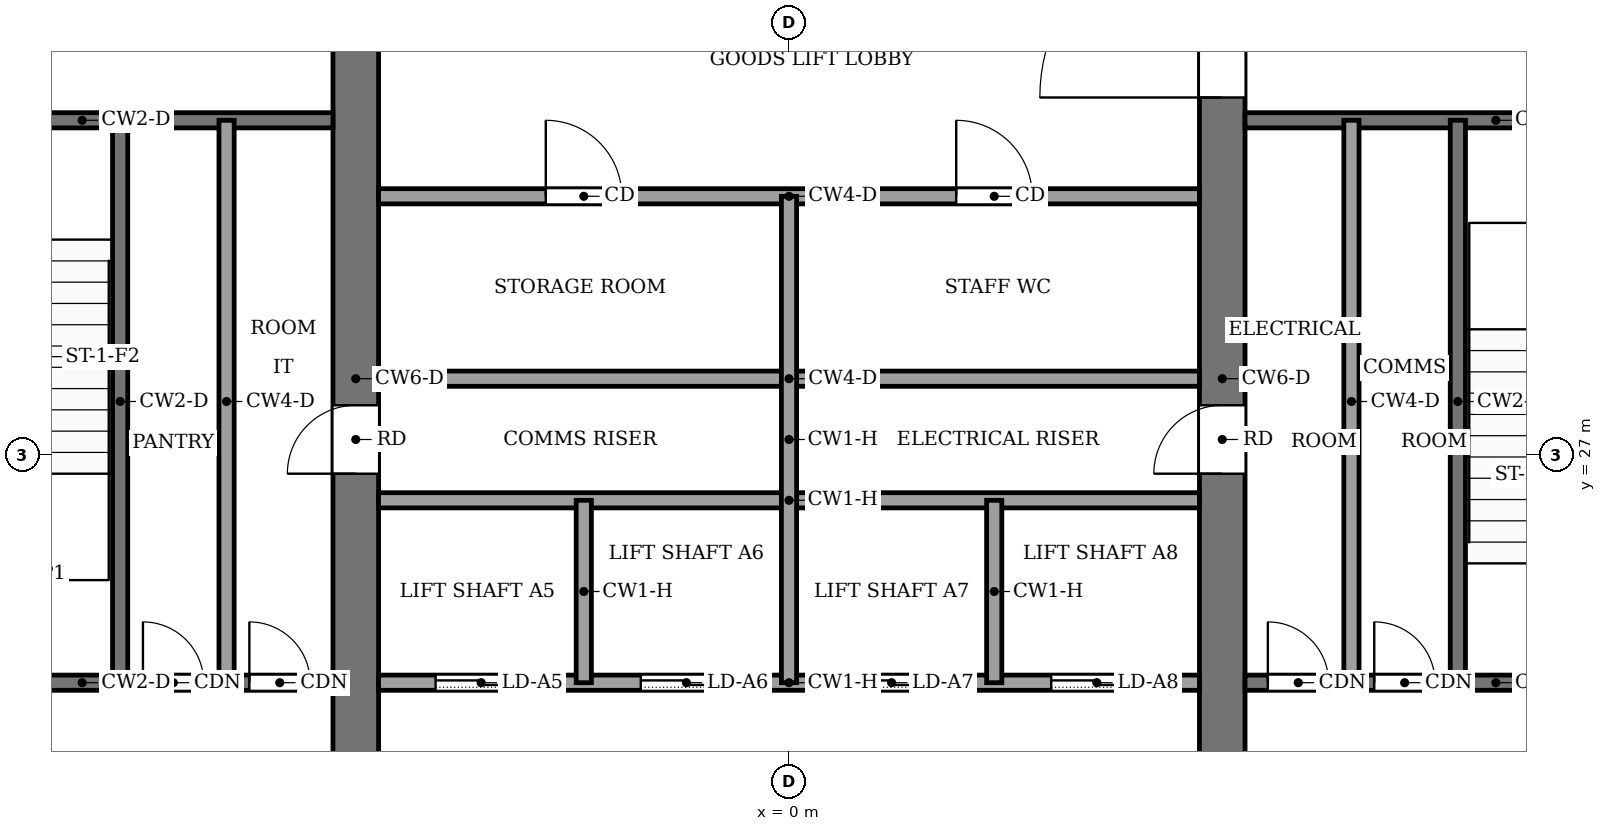
"""IFC4 building model, lengths in metres.
Left out: names, types, materials, properties, quantities, classifications, styles, units other than length and angle.
Written with IfcOpenShell. Run it as: python <this file> out.ifc"""

import sys

from ifc_helpers import new_model, si_unit, direction, frame, frame_2d, origin, place, context, subcontext, project, spatial, rectangle, extrude, element, fill, save


model = new_model("IFC4")
c1 = context("Model", 3, precision=1e-05, world=origin(), true_north=direction((0.0, 1.0)))
c2 = subcontext(c1, "Body", "Model", "MODEL_VIEW")
j1 = project(units=[si_unit("LENGTHUNIT", "METRE"), si_unit("PLANEANGLEUNIT", "RADIAN")], contexts=[c1])
p1 = place(None, origin())
s1 = spatial("IfcSite", under=j1, at=p1, CompositionType="ELEMENT")
p2 = place(p1, origin())
s2 = spatial("IfcBuilding", under=s1, at=p2, CompositionType="ELEMENT")
p3 = place(p2, frame((0.0, 0.0, 222.0)))
s3 = spatial("IfcBuildingStorey", under=s2, at=p3, CompositionType="ELEMENT", Elevation=222.0)
p4 = place(p3, frame((-5.7, 18.4, -0.13), z_axis=(0.0, 0.0, 1.0), x_axis=(0.0, 1.0, 0.0)))
e1 = element("IfcWall", 1, at=p4, inside=s3, PredefinedType="SHEAR", context=c2, shape_type="SweptSolid", body=[
    extrude(rectangle(XDim=19.2, YDim=0.6, at=frame_2d((9.6, 0.0))), origin(), (0.0, 0.0, 1.0), 3.88),
])
p5 = place(p4, frame((8.35, 0.0, 0.13)))
e2 = element("IfcOpeningElement", 2, at=p5, cuts=e1, PredefinedType="OPENING", context=c2, shape_type="SweptSolid", body=[
    extrude(rectangle(XDim=0.9, YDim=2.1, at=frame_2d((0.45, 1.05))), frame((0.0, 0.31, 0.0), z_axis=(0.0, -1.0, 0.0), x_axis=(1.0, 0.0, 0.0)), (0.0, 0.0, 1.0), 0.62),
])
p6 = place(p3, frame((5.7, 18.4, -0.13), z_axis=(0.0, 0.0, 1.0), x_axis=(0.0, 1.0, 0.0)))
e3 = element("IfcWall", 3, at=p6, inside=s3, PredefinedType="SHEAR", context=c2, shape_type="SweptSolid", body=[
    extrude(rectangle(XDim=19.2, YDim=0.6, at=frame_2d((9.6, 0.0))), origin(), (0.0, 0.0, 1.0), 3.88),
])
p7 = place(p6, frame((8.35, 0.0, 0.13)))
e4 = element("IfcOpeningElement", 4, at=p7, cuts=e3, PredefinedType="OPENING", context=c2, shape_type="SweptSolid", body=[
    extrude(rectangle(XDim=0.9, YDim=2.1, at=frame_2d((0.45, 1.05))), frame((0.0, 0.31, 0.0), z_axis=(0.0, -1.0, 0.0), x_axis=(1.0, 0.0, 0.0)), (0.0, 0.0, 1.0), 0.62),
])
p8 = place(p6, frame((13.3, 0.0, 0.13)))
e5 = element("IfcOpeningElement", 5, at=p8, cuts=e3, PredefinedType="OPENING", context=c2, shape_type="SweptSolid", body=[
    extrude(rectangle(XDim=2.4, YDim=2.4, at=frame_2d((1.2, 1.2))), frame((0.0, 0.31, 0.0), z_axis=(0.0, -1.0, 0.0), x_axis=(1.0, 0.0, 0.0)), (0.0, 0.0, 1.0), 0.62),
])
p9 = place(p3, frame((-12.6, 24.0, 0.0), z_axis=(0.0, 0.0, 1.0), x_axis=(1.0, 0.0, 0.0)))
e6 = element("IfcWall", 6, at=p9, inside=s3, PredefinedType="PARTITIONING", context=c2, shape_type="SweptSolid", body=[
    extrude(rectangle(XDim=6.6, YDim=0.2, at=frame_2d((3.3, 0.0))), origin(), (0.0, 0.0, 1.0), 3.75),
])
p10 = place(p9, frame((4.1, 0.0, 0.0)))
e7 = element("IfcOpeningElement", 7, at=p10, cuts=e6, PredefinedType="OPENING", context=c2, shape_type="SweptSolid", body=[
    extrude(rectangle(XDim=0.8, YDim=2.1, at=frame_2d((0.4, 1.05))), frame((0.0, 0.11, 0.0), z_axis=(0.0, -1.0, 0.0), x_axis=(1.0, 0.0, 0.0)), (0.0, 0.0, 1.0), 0.22),
])
p11 = place(p9, frame((5.5, 0.0, 0.0)))
e8 = element("IfcOpeningElement", 8, at=p11, cuts=e6, PredefinedType="OPENING", context=c2, shape_type="SweptSolid", body=[
    extrude(rectangle(XDim=0.8, YDim=2.1, at=frame_2d((0.4, 1.05))), frame((0.0, 0.11, 0.0), z_axis=(0.0, -1.0, 0.0), x_axis=(1.0, 0.0, 0.0)), (0.0, 0.0, 1.0), 0.22),
])
p12 = place(p3, frame((-5.4, 24.0, 0.0), z_axis=(0.0, 0.0, 1.0), x_axis=(1.0, 0.0, 0.0)))
e9 = element("IfcWall", 9, at=p12, inside=s3, PredefinedType="PARTITIONING", context=c2, shape_type="SweptSolid", body=[
    extrude(rectangle(XDim=10.8, YDim=0.2, at=frame_2d((5.4, 0.0))), origin(), (0.0, 0.0, 1.0), 3.75),
])
p13 = place(p12, frame((0.75, 0.0, 0.0)))
e10 = element("IfcOpeningElement", 10, at=p13, cuts=e9, PredefinedType="OPENING", context=c2, shape_type="SweptSolid", body=[
    extrude(rectangle(XDim=1.2, YDim=2.2, at=frame_2d((0.6, 1.1))), frame((0.0, 0.11, 0.0), z_axis=(0.0, -1.0, 0.0), x_axis=(1.0, 0.0, 0.0)), (0.0, 0.0, 1.0), 0.22),
])
p14 = place(p12, frame((3.45, 0.0, 0.0)))
e11 = element("IfcOpeningElement", 11, at=p14, cuts=e9, PredefinedType="OPENING", context=c2, shape_type="SweptSolid", body=[
    extrude(rectangle(XDim=1.2, YDim=2.2, at=frame_2d((0.6, 1.1))), frame((0.0, 0.11, 0.0), z_axis=(0.0, -1.0, 0.0), x_axis=(1.0, 0.0, 0.0)), (0.0, 0.0, 1.0), 0.22),
])
p15 = place(p12, frame((6.15, 0.0, 0.0)))
e12 = element("IfcOpeningElement", 12, at=p15, cuts=e9, PredefinedType="OPENING", context=c2, shape_type="SweptSolid", body=[
    extrude(rectangle(XDim=1.2, YDim=2.2, at=frame_2d((0.6, 1.1))), frame((0.0, 0.11, 0.0), z_axis=(0.0, -1.0, 0.0), x_axis=(1.0, 0.0, 0.0)), (0.0, 0.0, 1.0), 0.22),
])
p16 = place(p12, frame((8.85, 0.0, 0.0)))
e13 = element("IfcOpeningElement", 13, at=p16, cuts=e9, PredefinedType="OPENING", context=c2, shape_type="SweptSolid", body=[
    extrude(rectangle(XDim=1.2, YDim=2.2, at=frame_2d((0.6, 1.1))), frame((0.0, 0.11, 0.0), z_axis=(0.0, -1.0, 0.0), x_axis=(1.0, 0.0, 0.0)), (0.0, 0.0, 1.0), 0.22),
])
p17 = place(p3, frame((6.0, 24.0, 0.0), z_axis=(0.0, 0.0, 1.0), x_axis=(1.0, 0.0, 0.0)))
e14 = element("IfcWall", 14, at=p17, inside=s3, PredefinedType="PARTITIONING", context=c2, shape_type="SweptSolid", body=[
    extrude(rectangle(XDim=6.6, YDim=0.2, at=frame_2d((3.3, 0.0))), origin(), (0.0, 0.0, 1.0), 3.75),
])
p18 = place(p17, frame((0.3, 0.0, 0.0)))
e15 = element("IfcOpeningElement", 15, at=p18, cuts=e14, PredefinedType="OPENING", context=c2, shape_type="SweptSolid", body=[
    extrude(rectangle(XDim=0.8, YDim=2.1, at=frame_2d((0.4, 1.05))), frame((0.0, 0.11, 0.0), z_axis=(0.0, -1.0, 0.0), x_axis=(1.0, 0.0, 0.0)), (0.0, 0.0, 1.0), 0.22),
])
p19 = place(p17, frame((1.7, 0.0, 0.0)))
e16 = element("IfcOpeningElement", 16, at=p19, cuts=e14, PredefinedType="OPENING", context=c2, shape_type="SweptSolid", body=[
    extrude(rectangle(XDim=0.8, YDim=2.1, at=frame_2d((0.4, 1.05))), frame((0.0, 0.11, 0.0), z_axis=(0.0, -1.0, 0.0), x_axis=(1.0, 0.0, 0.0)), (0.0, 0.0, 1.0), 0.22),
])
p20 = place(p17, frame((4.4, 0.0, 0.0)))
e17 = element("IfcOpeningElement", 17, at=p20, cuts=e14, PredefinedType="OPENING", context=c2, shape_type="SweptSolid", body=[
    extrude(rectangle(XDim=1.2, YDim=2.2, at=frame_2d((0.6, 1.1))), frame((0.0, 0.11, 0.0), z_axis=(0.0, -1.0, 0.0), x_axis=(1.0, 0.0, 0.0)), (0.0, 0.0, 1.0), 0.22),
])
for number, where, z_axis, x_axis in (
    (18, (-5.4, 26.4, 0.0), (0.0, 0.0, 1.0), (1.0, 0.0, 0.0)),
    (19, (-5.4, 28.0, 0.0), (0.0, 0.0, 1.0), (1.0, 0.0, 0.0)),
):
    element("IfcWall", number, at=place(p3, frame(where, z_axis=z_axis, x_axis=x_axis)), inside=s3, PredefinedType="PARTITIONING", context=c2, shape_type="SweptSolid", body=[
        extrude(rectangle(XDim=10.8, YDim=0.2, at=frame_2d((5.4, 0.0))), origin(), (0.0, 0.0, 1.0), 3.75),
    ])
p21 = place(p3, frame((-5.4, 30.4, 0.0), z_axis=(0.0, 0.0, 1.0), x_axis=(1.0, 0.0, 0.0)))
e20 = element("IfcWall", 20, at=p21, inside=s3, PredefinedType="PARTITIONING", context=c2, shape_type="SweptSolid", body=[
    extrude(rectangle(XDim=10.8, YDim=0.2, at=frame_2d((5.4, 0.0))), origin(), (0.0, 0.0, 1.0), 3.75),
])
p22 = place(p21, frame((2.2, 0.0, 0.0)))
e21 = element("IfcOpeningElement", 21, at=p22, cuts=e20, PredefinedType="OPENING", context=c2, shape_type="SweptSolid", body=[
    extrude(rectangle(XDim=1.0, YDim=2.1, at=frame_2d((0.5, 1.05))), frame((0.0, 0.11, 0.0), z_axis=(0.0, -1.0, 0.0), x_axis=(1.0, 0.0, 0.0)), (0.0, 0.0, 1.0), 0.22),
])
p23 = place(p21, frame((7.6, 0.0, 0.0)))
e22 = element("IfcOpeningElement", 22, at=p23, cuts=e20, PredefinedType="OPENING", context=c2, shape_type="SweptSolid", body=[
    extrude(rectangle(XDim=1.0, YDim=2.1, at=frame_2d((0.5, 1.05))), frame((0.0, 0.11, 0.0), z_axis=(0.0, -1.0, 0.0), x_axis=(1.0, 0.0, 0.0)), (0.0, 0.0, 1.0), 0.22),
])
p24 = place(p3, frame((-12.6, 31.4, 0.0), z_axis=(0.0, 0.0, 1.0), x_axis=(1.0, 0.0, 0.0)))
e23 = element("IfcWall", 23, at=p24, inside=s3, PredefinedType="PARTITIONING", context=c2, shape_type="SweptSolid", body=[
    extrude(rectangle(XDim=6.6, YDim=0.2, at=frame_2d((3.3, 0.0))), origin(), (0.0, 0.0, 1.0), 3.75),
])
p25 = place(p24, frame((1.0, 0.0, 0.0)))
e24 = element("IfcOpeningElement", 24, at=p25, cuts=e23, PredefinedType="OPENING", context=c2, shape_type="SweptSolid", body=[
    extrude(rectangle(XDim=1.2, YDim=2.2, at=frame_2d((0.6, 1.1))), frame((0.0, 0.11, 0.0), z_axis=(0.0, -1.0, 0.0), x_axis=(1.0, 0.0, 0.0)), (0.0, 0.0, 1.0), 0.22),
])
p26 = place(p3, frame((6.0, 31.4, 0.0), z_axis=(0.0, 0.0, 1.0), x_axis=(1.0, 0.0, 0.0)))
e25 = element("IfcWall", 25, at=p26, inside=s3, PredefinedType="PARTITIONING", context=c2, shape_type="SweptSolid", body=[
    extrude(rectangle(XDim=6.6, YDim=0.2, at=frame_2d((3.3, 0.0))), origin(), (0.0, 0.0, 1.0), 3.75),
])
for number, where, z_axis, x_axis in (
    (26, (-8.8, 24.0, 0.0), (0.0, 0.0, 1.0), (0.0, 1.0, 0.0)),
    (27, (-7.4, 24.0, 0.0), (0.0, 0.0, 1.0), (0.0, 1.0, 0.0)),
):
    element("IfcWall", number, at=place(p3, frame(where, z_axis=z_axis, x_axis=x_axis)), inside=s3, PredefinedType="PARTITIONING", context=c2, shape_type="SweptSolid", body=[
        extrude(rectangle(XDim=7.4, YDim=0.2, at=frame_2d((3.7, 0.0))), origin(), (0.0, 0.0, 1.0), 3.75),
    ])
p27 = place(p3, frame((-2.7, 24.0, 0.0), z_axis=(0.0, 0.0, 1.0), x_axis=(0.0, 1.0, 0.0)))
e28 = element("IfcWall", 28, at=p27, inside=s3, PredefinedType="PARTITIONING", context=c2, shape_type="SweptSolid", body=[
    extrude(rectangle(XDim=2.4, YDim=0.2, at=frame_2d((1.2, 0.0))), origin(), (0.0, 0.0, 1.0), 3.75),
])
p28 = place(p3, frame((0.0, 24.0, 0.0), z_axis=(0.0, 0.0, 1.0), x_axis=(0.0, 1.0, 0.0)))
e29 = element("IfcWall", 29, at=p28, inside=s3, PredefinedType="PARTITIONING", context=c2, shape_type="SweptSolid", body=[
    extrude(rectangle(XDim=6.4, YDim=0.2, at=frame_2d((3.2, 0.0))), origin(), (0.0, 0.0, 1.0), 3.75),
])
p29 = place(p3, frame((2.7, 24.0, 0.0), z_axis=(0.0, 0.0, 1.0), x_axis=(0.0, 1.0, 0.0)))
e30 = element("IfcWall", 30, at=p29, inside=s3, PredefinedType="PARTITIONING", context=c2, shape_type="SweptSolid", body=[
    extrude(rectangle(XDim=2.4, YDim=0.2, at=frame_2d((1.2, 0.0))), origin(), (0.0, 0.0, 1.0), 3.75),
])
for number, where, z_axis, x_axis in (
    (31, (7.4, 24.0, 0.0), (0.0, 0.0, 1.0), (0.0, 1.0, 0.0)),
    (32, (8.8, 24.0, 0.0), (0.0, 0.0, 1.0), (0.0, 1.0, 0.0)),
):
    element("IfcWall", number, at=place(p3, frame(where, z_axis=z_axis, x_axis=x_axis)), inside=s3, PredefinedType="PARTITIONING", context=c2, shape_type="SweptSolid", body=[
        extrude(rectangle(XDim=7.4, YDim=0.2, at=frame_2d((3.7, 0.0))), origin(), (0.0, 0.0, 1.0), 3.75),
    ])
p30 = place(p13, origin())
e33 = element("IfcDoor", 33, at=p30, inside=s3, OperationType="SLIDING_TO_LEFT", PredefinedType="DOOR", context=c2, shape_type="SweptSolid", body=[
    extrude(rectangle(XDim=1.2, YDim=2.2, at=frame_2d((0.6, 1.1))), frame((0.0, 0.025, 0.0), z_axis=(0.0, -1.0, 0.0), x_axis=(1.0, 0.0, 0.0)), (0.0, 0.0, 1.0), 0.05),
])
fill(e10, e33)
p31 = place(p14, origin())
e34 = element("IfcDoor", 34, at=p31, inside=s3, OperationType="SLIDING_TO_LEFT", PredefinedType="DOOR", context=c2, shape_type="SweptSolid", body=[
    extrude(rectangle(XDim=1.2, YDim=2.2, at=frame_2d((0.6, 1.1))), frame((0.0, 0.025, 0.0), z_axis=(0.0, -1.0, 0.0), x_axis=(1.0, 0.0, 0.0)), (0.0, 0.0, 1.0), 0.05),
])
fill(e11, e34)
p32 = place(p15, origin())
e35 = element("IfcDoor", 35, at=p32, inside=s3, OperationType="SLIDING_TO_LEFT", PredefinedType="DOOR", context=c2, shape_type="SweptSolid", body=[
    extrude(rectangle(XDim=1.2, YDim=2.2, at=frame_2d((0.6, 1.1))), frame((0.0, 0.025, 0.0), z_axis=(0.0, -1.0, 0.0), x_axis=(1.0, 0.0, 0.0)), (0.0, 0.0, 1.0), 0.05),
])
fill(e12, e35)
p33 = place(p16, origin())
e36 = element("IfcDoor", 36, at=p33, inside=s3, OperationType="SLIDING_TO_LEFT", PredefinedType="DOOR", context=c2, shape_type="SweptSolid", body=[
    extrude(rectangle(XDim=1.2, YDim=2.2, at=frame_2d((0.6, 1.1))), frame((0.0, 0.025, 0.0), z_axis=(0.0, -1.0, 0.0), x_axis=(1.0, 0.0, 0.0)), (0.0, 0.0, 1.0), 0.05),
])
fill(e13, e36)
p34 = place(p22, origin())
e37 = element("IfcDoor", 37, at=p34, inside=s3, OperationType="SINGLE_SWING_LEFT", PredefinedType="DOOR", context=c2, shape_type="SweptSolid", body=[
    extrude(rectangle(XDim=1.0, YDim=2.1, at=frame_2d((0.5, 1.05))), frame((0.0, 0.025, 0.0), z_axis=(0.0, -1.0, 0.0), x_axis=(1.0, 0.0, 0.0)), (0.0, 0.0, 1.0), 0.05),
])
fill(e21, e37)
p35 = place(p23, origin())
e38 = element("IfcDoor", 38, at=p35, inside=s3, OperationType="SINGLE_SWING_RIGHT", PredefinedType="DOOR", context=c2, shape_type="SweptSolid", body=[
    extrude(rectangle(XDim=1.0, YDim=2.1, at=frame_2d((0.5, 1.05))), frame((0.0, 0.025, 0.0), z_axis=(0.0, -1.0, 0.0), x_axis=(1.0, 0.0, 0.0)), (0.0, 0.0, 1.0), 0.05),
])
fill(e22, e38)
p36 = place(p10, origin())
e39 = element("IfcDoor", 39, at=p36, inside=s3, OperationType="SINGLE_SWING_RIGHT", PredefinedType="DOOR", context=c2, shape_type="SweptSolid", body=[
    extrude(rectangle(XDim=0.8, YDim=2.1, at=frame_2d((0.4, 1.05))), frame((0.0, 0.025, 0.0), z_axis=(0.0, -1.0, 0.0), x_axis=(1.0, 0.0, 0.0)), (0.0, 0.0, 1.0), 0.05),
])
fill(e7, e39)
p37 = place(p11, origin())
e40 = element("IfcDoor", 40, at=p37, inside=s3, OperationType="SINGLE_SWING_LEFT", PredefinedType="DOOR", context=c2, shape_type="SweptSolid", body=[
    extrude(rectangle(XDim=0.8, YDim=2.1, at=frame_2d((0.4, 1.05))), frame((0.0, 0.025, 0.0), z_axis=(0.0, -1.0, 0.0), x_axis=(1.0, 0.0, 0.0)), (0.0, 0.0, 1.0), 0.05),
])
fill(e8, e40)
p38 = place(p18, origin())
e41 = element("IfcDoor", 41, at=p38, inside=s3, OperationType="SINGLE_SWING_RIGHT", PredefinedType="DOOR", context=c2, shape_type="SweptSolid", body=[
    extrude(rectangle(XDim=0.8, YDim=2.1, at=frame_2d((0.4, 1.05))), frame((0.0, 0.025, 0.0), z_axis=(0.0, -1.0, 0.0), x_axis=(1.0, 0.0, 0.0)), (0.0, 0.0, 1.0), 0.05),
])
fill(e15, e41)
p39 = place(p19, origin())
e42 = element("IfcDoor", 42, at=p39, inside=s3, OperationType="SINGLE_SWING_LEFT", PredefinedType="DOOR", context=c2, shape_type="SweptSolid", body=[
    extrude(rectangle(XDim=0.8, YDim=2.1, at=frame_2d((0.4, 1.05))), frame((0.0, 0.025, 0.0), z_axis=(0.0, -1.0, 0.0), x_axis=(1.0, 0.0, 0.0)), (0.0, 0.0, 1.0), 0.05),
])
fill(e16, e42)
p40 = place(p5, origin())
e43 = element("IfcDoor", 43, at=p40, inside=s3, OperationType="SINGLE_SWING_LEFT", PredefinedType="DOOR", context=c2, shape_type="SweptSolid", body=[
    extrude(rectangle(XDim=0.9, YDim=2.1, at=frame_2d((0.45, 1.05))), frame((0.0, 0.025, 0.0), z_axis=(0.0, -1.0, 0.0), x_axis=(1.0, 0.0, 0.0)), (0.0, 0.0, 1.0), 0.05),
])
fill(e2, e43)
p41 = place(p7, origin())
e44 = element("IfcDoor", 44, at=p41, inside=s3, OperationType="SINGLE_SWING_RIGHT", PredefinedType="DOOR", context=c2, shape_type="SweptSolid", body=[
    extrude(rectangle(XDim=0.9, YDim=2.1, at=frame_2d((0.45, 1.05))), frame((0.0, 0.025, 0.0), z_axis=(0.0, -1.0, 0.0), x_axis=(1.0, 0.0, 0.0)), (0.0, 0.0, 1.0), 0.05),
])
fill(e4, e44)
p42 = place(p8, origin())
e45 = element("IfcDoor", 45, at=p42, inside=s3, OperationType="DOUBLE_DOOR_SINGLE_SWING", PredefinedType="DOOR", context=c2, shape_type="SweptSolid", body=[
    extrude(rectangle(XDim=2.4, YDim=2.4, at=frame_2d((1.2, 1.2))), frame((0.0, 0.025, 0.0), z_axis=(0.0, -1.0, 0.0), x_axis=(1.0, 0.0, 0.0)), (0.0, 0.0, 1.0), 0.05),
])
fill(e5, e45)
save(model, sys.argv[1])
